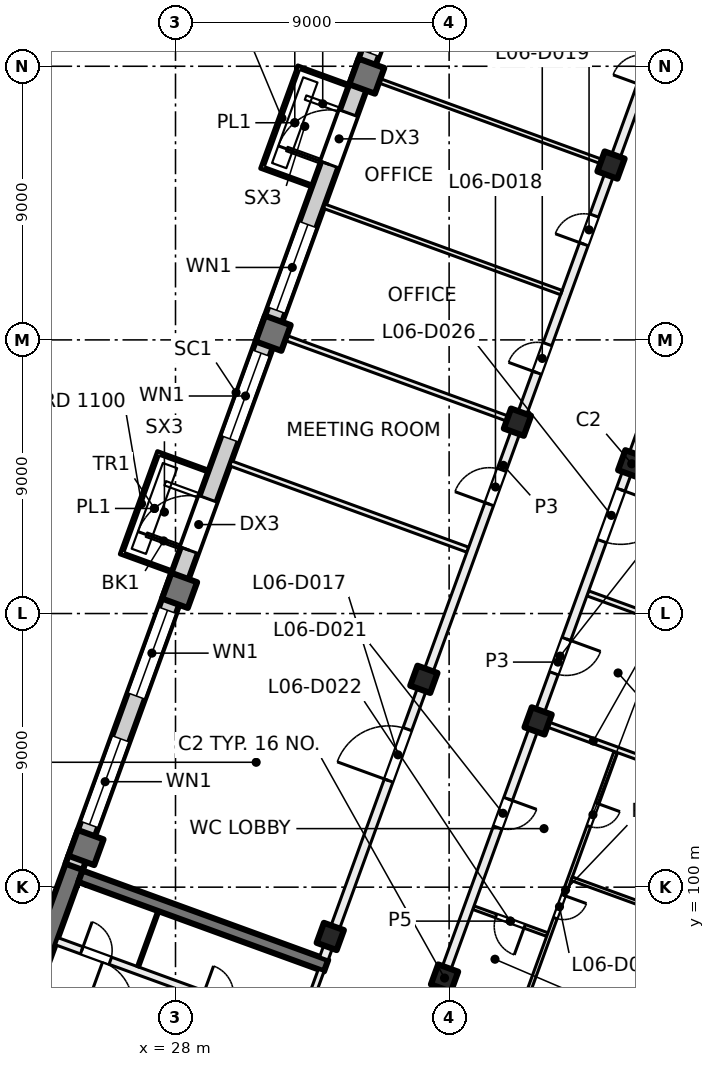
"""IFC4 building model, lengths in metres.
Left out: names, types, materials, properties, quantities, classifications, styles, units other than length and angle.
Written with IfcOpenShell. Run it as: python <this file> out.ifc"""

import sys

from ifc_helpers import new_model, si_unit, direction, frame, frame_2d, origin, origin_2d, place, context, subcontext, project, spatial, rectangle, extrude, element, fill, save


model = new_model("IFC4")
c1 = context("Model", 3, precision=1e-05, world=origin(), true_north=direction((0.0, 1.0)))
c2 = subcontext(c1, "Body", "Model", "MODEL_VIEW")
j1 = project(units=[si_unit("LENGTHUNIT", "METRE"), si_unit("PLANEANGLEUNIT", "RADIAN")], contexts=[c1])
p1 = place(None, origin())
s1 = spatial("IfcSite", under=j1, at=p1, CompositionType="ELEMENT")
p2 = place(p1, origin())
s2 = spatial("IfcBuilding", under=s1, at=p2, CompositionType="ELEMENT")
p3 = place(p2, frame((0.0, 0.0, 31.5)))
s3 = spatial("IfcBuildingStorey", under=s2, at=p3, CompositionType="ELEMENT", Elevation=31.5)
for number, where, z_axis, x_axis in (
    (1, (43.006, 113.925, 0.0), (0.0, 0.0, 1.0), (-0.342, -0.94, 0.0)),
    (2, (39.927, 105.468, 0.0), (0.0, 0.0, 1.0), (-0.342, -0.94, 0.0)),
    (3, (36.849, 97.011, 0.0), (0.0, 0.0, 1.0), (-0.342, -0.94, 0.0)),
    (4, (42.325, 123.751, 0.0), (0.0, 0.0, 1.0), (-0.342, -0.94, 0.0)),
    (5, (39.247, 115.293, 0.0), (0.0, 0.0, 1.0), (-0.342, -0.94, 0.0)),
    (6, (36.169, 106.836, 0.0), (0.0, 0.0, 1.0), (-0.342, -0.94, 0.0)),
    (7, (33.091, 98.379, 0.0), (0.0, 0.0, 1.0), (-0.342, -0.94, 0.0)),
):
    element("IfcColumn", number, at=place(p3, frame(where, z_axis=z_axis, x_axis=x_axis)), inside=s3, PredefinedType="COLUMN", context=c2, shape_type="SweptSolid", body=[
        extrude(rectangle(XDim=0.7, YDim=0.7, at=origin_2d()), origin(), (0.0, 0.0, 1.0), 4.0),
    ])
for number, where, z_axis, x_axis in (
    (8, (34.291, 126.675, 0.0), (0.0, 0.0, 1.0), (-0.342, -0.94, 0.0)),
    (9, (31.212, 118.218, 0.0), (0.0, 0.0, 1.0), (-0.342, -0.94, 0.0)),
    (10, (28.134, 109.76, 0.0), (0.0, 0.0, 1.0), (-0.342, -0.94, 0.0)),
    (11, (25.056, 101.303, 0.0), (0.0, 0.0, 1.0), (-0.342, -0.94, 0.0)),
):
    element("IfcColumn", number, at=place(p3, frame(where, z_axis=z_axis, x_axis=x_axis)), inside=s3, PredefinedType="COLUMN", context=c2, shape_type="SweptSolid", body=[
        extrude(rectangle(XDim=0.9, YDim=0.9, at=origin_2d()), origin(), (0.0, 0.0, 1.0), 4.0),
    ])
p4 = place(p3, frame((21.717, 92.568, 0.0), z_axis=(0.0, 0.0, 1.0), x_axis=(0.342016162452, 0.939694069696, 0.0)))
e12 = element("IfcWall", 12, at=p4, inside=s3, PredefinedType="SHEAR", context=c2, shape_type="SweptSolid", body=[
    extrude(rectangle(XDim=8.9, YDim=0.6, at=frame_2d((4.45, 0.0))), origin(), (0.0, 0.0, 1.0), 4.0),
])
p5 = place(p3, frame((32.953, 97.418, 0.0), z_axis=(0.0, 0.0, 1.0), x_axis=(-0.93969060187, 0.342025690201, 0.0)))
e13 = element("IfcWall", 13, at=p5, inside=s3, PredefinedType="SHEAR", context=c2, shape_type="SweptSolid", body=[
    extrude(rectangle(XDim=8.6, YDim=0.4, at=frame_2d((4.3, 0.0))), origin(), (0.0, 0.0, 1.0), 4.0),
])
p6 = place(p3, frame((24.666, 100.669, 0.0), z_axis=(0.0, 0.0, 1.0), x_axis=(0.34201964167, 0.939692803373, 0.0)))
e14 = element("IfcWall", 14, at=p6, inside=s3, PredefinedType="SOLIDWALL", context=c2, shape_type="SweptSolid", body=[
    extrude(rectangle(XDim=32.884, YDim=0.6, at=frame_2d((16.442, 0.0))), origin(), (0.0, 0.0, 1.0), 3.625),
])
p7 = place(p6, frame((1.48, 0.0, 0.9)))
e15 = element("IfcOpeningElement", 15, at=p7, cuts=e14, PredefinedType="OPENING", context=c2, shape_type="SweptSolid", body=[
    extrude(rectangle(XDim=3.0, YDim=2.4, at=frame_2d((1.5, 1.2))), frame((0.0, 0.31, 0.0), z_axis=(0.0, -1.0, 0.0), x_axis=(1.0, 0.0, 0.0)), (0.0, 0.0, 1.0), 0.62),
])
p8 = place(p6, frame((5.98, 0.0, 0.9)))
e16 = element("IfcOpeningElement", 16, at=p8, cuts=e14, PredefinedType="OPENING", context=c2, shape_type="SweptSolid", body=[
    extrude(rectangle(XDim=3.0, YDim=2.4, at=frame_2d((1.5, 1.2))), frame((0.0, 0.31, 0.0), z_axis=(0.0, -1.0, 0.0), x_axis=(1.0, 0.0, 0.0)), (0.0, 0.0, 1.0), 0.62),
])
p9 = place(p6, frame((11.08, 0.0, 0.0)))
e17 = element("IfcOpeningElement", 17, at=p9, cuts=e14, PredefinedType="OPENING", context=c2, shape_type="SweptSolid", body=[
    extrude(rectangle(XDim=1.8, YDim=2.4, at=frame_2d((0.9, 1.2))), frame((0.0, 0.31, 0.0), z_axis=(0.0, -1.0, 0.0), x_axis=(1.0, 0.0, 0.0)), (0.0, 0.0, 1.0), 0.62),
])
p10 = place(p6, frame((14.98, 0.0, 0.9)))
e18 = element("IfcOpeningElement", 18, at=p10, cuts=e14, PredefinedType="OPENING", context=c2, shape_type="SweptSolid", body=[
    extrude(rectangle(XDim=3.0, YDim=2.4, at=frame_2d((1.5, 1.2))), frame((0.0, 0.31, 0.0), z_axis=(0.0, -1.0, 0.0), x_axis=(1.0, 0.0, 0.0)), (0.0, 0.0, 1.0), 0.62),
])
p11 = place(p6, frame((19.48, 0.0, 0.9)))
e19 = element("IfcOpeningElement", 19, at=p11, cuts=e14, PredefinedType="OPENING", context=c2, shape_type="SweptSolid", body=[
    extrude(rectangle(XDim=3.0, YDim=2.4, at=frame_2d((1.5, 1.2))), frame((0.0, 0.31, 0.0), z_axis=(0.0, -1.0, 0.0), x_axis=(1.0, 0.0, 0.0)), (0.0, 0.0, 1.0), 0.62),
])
p12 = place(p6, frame((24.58, 0.0, 0.0)))
e20 = element("IfcOpeningElement", 20, at=p12, cuts=e14, PredefinedType="OPENING", context=c2, shape_type="SweptSolid", body=[
    extrude(rectangle(XDim=1.8, YDim=2.4, at=frame_2d((0.9, 1.2))), frame((0.0, 0.31, 0.0), z_axis=(0.0, -1.0, 0.0), x_axis=(1.0, 0.0, 0.0)), (0.0, 0.0, 1.0), 0.62),
])
p13 = place(p6, frame((28.48, 0.0, 0.9)))
e21 = element("IfcOpeningElement", 21, at=p13, cuts=e14, PredefinedType="OPENING", context=c2, shape_type="SweptSolid", body=[
    extrude(rectangle(XDim=3.0, YDim=2.4, at=frame_2d((1.5, 1.2))), frame((0.0, 0.31, 0.0), z_axis=(0.0, -1.0, 0.0), x_axis=(1.0, 0.0, 0.0)), (0.0, 0.0, 1.0), 0.62),
])
p14 = place(p3, frame((31.491, 93.693, 0.0), z_axis=(0.0, 0.0, 1.0), x_axis=(0.341995824804, 0.939701471648, 0.0)))
e22 = element("IfcWall", 22, at=p14, inside=s3, PredefinedType="PARTITIONING", context=c2, shape_type="SweptSolid", body=[
    extrude(rectangle(XDim=3.8, YDim=0.2, at=frame_2d((1.9, 0.0))), origin(), (0.0, 0.0, 1.0), 3.625),
])
p15 = place(p14, frame((0.3, 0.0, 0.0)))
e23 = element("IfcOpeningElement", 23, at=p15, cuts=e22, PredefinedType="OPENING", context=c2, shape_type="SweptSolid", body=[
    extrude(rectangle(XDim=1.2, YDim=2.1, at=frame_2d((0.6, 1.05))), frame((0.0, 0.11, 0.0), z_axis=(0.0, -1.0, 0.0), x_axis=(1.0, 0.0, 0.0)), (0.0, 0.0, 1.0), 0.22),
])
p16 = place(p3, frame((23.538, 96.694, 0.0), z_axis=(0.0, 0.0, 1.0), x_axis=(0.939691552312, -0.342023078919, 0.0)))
e24 = element("IfcWall", 24, at=p16, inside=s3, PredefinedType="PARTITIONING", context=c2, shape_type="SweptSolid", body=[
    extrude(rectangle(XDim=8.4, YDim=0.2, at=frame_2d((4.2, 0.0))), origin(), (0.0, 0.0, 1.0), 3.625),
])
p17 = place(p16, frame((1.65, 0.0, 0.0)))
e25 = element("IfcOpeningElement", 25, at=p17, cuts=e24, PredefinedType="OPENING", context=c2, shape_type="SweptSolid", body=[
    extrude(rectangle(XDim=1.5, YDim=2.1, at=frame_2d((0.75, 1.05))), frame((0.0, 0.11, 0.0), z_axis=(0.0, -1.0, 0.0), x_axis=(1.0, 0.0, 0.0)), (0.0, 0.0, 1.0), 0.22),
])
p18 = place(p3, frame((24.094, 98.221, 0.0), z_axis=(0.0, 0.0, 1.0), x_axis=(0.939691552312, -0.342023078919, 0.0)))
e26 = element("IfcWall", 26, at=p18, inside=s3, PredefinedType="PARTITIONING", context=c2, shape_type="SweptSolid", body=[
    extrude(rectangle(XDim=8.4, YDim=0.25, at=frame_2d((4.2, 0.0))), origin(), (0.0, 0.0, 1.0), 3.625),
])
p19 = place(p18, frame((5.125, 0.0, 0.0)))
e27 = element("IfcOpeningElement", 27, at=p19, cuts=e26, PredefinedType="OPENING", context=c2, shape_type="SweptSolid", body=[
    extrude(rectangle(XDim=1.0, YDim=2.1, at=frame_2d((0.5, 1.05))), frame((0.0, 0.135, 0.0), z_axis=(0.0, -1.0, 0.0), x_axis=(1.0, 0.0, 0.0)), (0.0, 0.0, 1.0), 0.27),
])
p20 = place(p18, frame((0.875, 0.0, 0.0)))
e28 = element("IfcOpeningElement", 28, at=p20, cuts=e26, PredefinedType="OPENING", context=c2, shape_type="SweptSolid", body=[
    extrude(rectangle(XDim=1.0, YDim=2.1, at=frame_2d((0.5, 1.05))), frame((0.0, 0.135, 0.0), z_axis=(0.0, -1.0, 0.0), x_axis=(1.0, 0.0, 0.0)), (0.0, 0.0, 1.0), 0.27),
])
p21 = place(p3, frame((26.768, 97.381, 0.0), z_axis=(0.0, 0.0, 1.0), x_axis=(0.342024501273, 0.939691034611, 0.0)))
e29 = element("IfcWall", 29, at=p21, inside=s3, PredefinedType="PARTITIONING", context=c2, shape_type="SweptSolid", body=[
    extrude(rectangle(XDim=1.95, YDim=0.1, at=frame_2d((0.975, 0.0))), origin(), (0.0, 0.0, 1.0), 3.625),
])
p22 = place(p3, frame((29.814, 113.938, 0.0), z_axis=(0.0, 0.0, 1.0), x_axis=(0.939697205528, -0.342007546586, 0.0)))
e30 = element("IfcWall", 30, at=p22, inside=s3, PredefinedType="PARTITIONING", context=c2, shape_type="SweptSolid", body=[
    extrude(rectangle(XDim=8.301, YDim=0.175, at=frame_2d((4.15, 0.0))), origin(), (0.0, 0.0, 1.0), 3.625),
])
p23 = place(p3, frame((31.353, 118.166, 0.0), z_axis=(0.0, 0.0, 1.0), x_axis=(0.939687752599, -0.342033518263, 0.0)))
e31 = element("IfcWall", 31, at=p23, inside=s3, PredefinedType="PARTITIONING", context=c2, shape_type="SweptSolid", body=[
    extrude(rectangle(XDim=8.301, YDim=0.175, at=frame_2d((4.15, 0.0))), origin(), (0.0, 0.0, 1.0), 3.625),
])
p24 = place(p3, frame((32.881, 97.657, 0.0), z_axis=(0.0, 0.0, 1.0), x_axis=(0.342017360004, 0.939693633828, 0.0)))
e32 = element("IfcWall", 32, at=p24, inside=s3, PredefinedType="PARTITIONING", context=c2, shape_type="SweptSolid", body=[
    extrude(rectangle(XDim=34.516, YDim=0.3, at=frame_2d((17.258, 0.0))), origin(), (0.0, 0.0, 1.0), 3.625),
])
p25 = place(p24, frame((6.225, 0.0, 0.0)))
e33 = element("IfcOpeningElement", 33, at=p25, cuts=e32, PredefinedType="OPENING", context=c2, shape_type="SweptSolid", body=[
    extrude(rectangle(XDim=1.8, YDim=2.1, at=frame_2d((0.9, 1.05))), frame((0.0, 0.16, 0.0), z_axis=(0.0, -1.0, 0.0), x_axis=(1.0, 0.0, 0.0)), (0.0, 0.0, 1.0), 0.32),
])
p26 = place(p24, frame((15.9, 0.0, 0.0)))
e34 = element("IfcOpeningElement", 34, at=p26, cuts=e32, PredefinedType="OPENING", context=c2, shape_type="SweptSolid", body=[
    extrude(rectangle(XDim=1.2, YDim=2.1, at=frame_2d((0.6, 1.05))), frame((0.0, 0.16, 0.0), z_axis=(0.0, -1.0, 0.0), x_axis=(1.0, 0.0, 0.0)), (0.0, 0.0, 1.0), 0.32),
])
p27 = place(p24, frame((20.5, 0.0, 0.0)))
e35 = element("IfcOpeningElement", 35, at=p27, cuts=e32, PredefinedType="OPENING", context=c2, shape_type="SweptSolid", body=[
    extrude(rectangle(XDim=1.0, YDim=2.1, at=frame_2d((0.5, 1.05))), frame((0.0, 0.16, 0.0), z_axis=(0.0, -1.0, 0.0), x_axis=(1.0, 0.0, 0.0)), (0.0, 0.0, 1.0), 0.32),
])
p28 = place(p24, frame((25.0, 0.0, 0.0)))
e36 = element("IfcOpeningElement", 36, at=p28, cuts=e32, PredefinedType="OPENING", context=c2, shape_type="SweptSolid", body=[
    extrude(rectangle(XDim=1.0, YDim=2.1, at=frame_2d((0.5, 1.05))), frame((0.0, 0.16, 0.0), z_axis=(0.0, -1.0, 0.0), x_axis=(1.0, 0.0, 0.0)), (0.0, 0.0, 1.0), 0.32),
])
p29 = place(p24, frame((30.562, 0.0, 0.0)))
e37 = element("IfcOpeningElement", 37, at=p29, cuts=e32, PredefinedType="OPENING", context=c2, shape_type="SweptSolid", body=[
    extrude(rectangle(XDim=1.0, YDim=2.1, at=frame_2d((0.5, 1.05))), frame((0.0, 0.16, 0.0), z_axis=(0.0, -1.0, 0.0), x_axis=(1.0, 0.0, 0.0)), (0.0, 0.0, 1.0), 0.32),
])
p30 = place(p3, frame((32.892, 122.395, 0.0), z_axis=(0.0, 0.0, 1.0), x_axis=(0.939684311623, -0.3420429717, 0.0)))
e38 = element("IfcWall", 38, at=p30, inside=s3, PredefinedType="PARTITIONING", context=c2, shape_type="SweptSolid", body=[
    extrude(rectangle(XDim=8.301, YDim=0.15, at=frame_2d((4.15, 0.0))), origin(), (0.0, 0.0, 1.0), 3.625),
])
p31 = place(p3, frame((40.229, 98.441, 0.0), z_axis=(0.0, 0.0, 1.0), x_axis=(-0.939663852573, 0.342099173001, 0.0)))
e39 = element("IfcWall", 39, at=p31, inside=s3, PredefinedType="PARTITIONING", context=c2, shape_type="SweptSolid", body=[
    extrude(rectangle(XDim=2.587, YDim=0.125, at=frame_2d((1.293, 0.0))), origin(), (0.0, 0.0, 1.0), 3.625),
])
p32 = place(p31, frame((0.794, 0.0, 0.0)))
e40 = element("IfcOpeningElement", 40, at=p32, cuts=e39, PredefinedType="OPENING", context=c2, shape_type="SweptSolid", body=[
    extrude(rectangle(XDim=1.0, YDim=2.1, at=frame_2d((0.5, 1.05))), frame((0.0, 0.073, 0.0), z_axis=(0.0, -1.0, 0.0), x_axis=(1.0, 0.0, 0.0)), (0.0, 0.0, 1.0), 0.145),
])
p33 = place(p3, frame((42.482, 104.446, 0.0), z_axis=(0.0, 0.0, 1.0), x_axis=(-0.342025030348, -0.939690842041, 0.0)))
e41 = element("IfcWall", 41, at=p33, inside=s3, PredefinedType="PARTITIONING", context=c2, shape_type="SweptSolid", body=[
    extrude(rectangle(XDim=9.663, YDim=0.125, at=frame_2d((4.832, 0.0))), origin(), (0.0, 0.0, 1.0), 3.625),
])
p34 = place(p33, frame((1.797, 0.0, 0.0)))
e42 = element("IfcOpeningElement", 42, at=p34, cuts=e41, PredefinedType="OPENING", context=c2, shape_type="SweptSolid", body=[
    extrude(rectangle(XDim=0.8, YDim=2.1, at=frame_2d((0.4, 1.05))), frame((0.0, 0.073, 0.0), z_axis=(0.0, -1.0, 0.0), x_axis=(1.0, 0.0, 0.0)), (0.0, 0.0, 1.0), 0.145),
])
p35 = place(p33, frame((5.015, 0.0, 0.0)))
e43 = element("IfcOpeningElement", 43, at=p35, cuts=e41, PredefinedType="OPENING", context=c2, shape_type="SweptSolid", body=[
    extrude(rectangle(XDim=0.8, YDim=2.1, at=frame_2d((0.4, 1.05))), frame((0.0, 0.073, 0.0), z_axis=(0.0, -1.0, 0.0), x_axis=(1.0, 0.0, 0.0)), (0.0, 0.0, 1.0), 0.145),
])
p36 = place(p3, frame((40.021, 105.434, 0.0), z_axis=(0.0, 0.0, 1.0), x_axis=(0.939740864669, -0.341887565249, 0.0)))
e44 = element("IfcWall", 44, at=p36, inside=s3, PredefinedType="PARTITIONING", context=c2, shape_type="SweptSolid", body=[
    extrude(rectangle(XDim=3.663, YDim=0.175, at=frame_2d((1.831, 0.0))), origin(), (0.0, 0.0, 1.0), 3.625),
])
p37 = place(p3, frame((41.031, 100.278, 0.0), z_axis=(0.0, 0.0, 1.0), x_axis=(0.939696437289, -0.342009657388, 0.0)))
e45 = element("IfcWall", 45, at=p37, inside=s3, PredefinedType="PARTITIONING", context=c2, shape_type="SweptSolid", body=[
    extrude(rectangle(XDim=5.588, YDim=0.125, at=frame_2d((2.794, 0.0))), origin(), (0.0, 0.0, 1.0), 3.625),
])
p38 = place(p3, frame((41.561, 109.663, 0.0), z_axis=(0.0, 0.0, 1.0), x_axis=(0.939623960717, -0.342208726434, 0.0)))
e46 = element("IfcWall", 46, at=p38, inside=s3, PredefinedType="PARTITIONING", context=c2, shape_type="SweptSolid", body=[
    extrude(rectangle(XDim=3.662, YDim=0.175, at=frame_2d((1.831, 0.0))), origin(), (0.0, 0.0, 1.0), 3.625),
])
p39 = place(p3, frame((42.231, 123.785, 0.0), z_axis=(0.0, 0.0, 1.0), x_axis=(-0.939687752599, 0.342033518263, 0.0)))
e47 = element("IfcWall", 47, at=p39, inside=s3, PredefinedType="PARTITIONING", context=c2, shape_type="SweptSolid", body=[
    extrude(rectangle(XDim=8.301, YDim=0.15, at=frame_2d((4.15, 0.0))), origin(), (0.0, 0.0, 1.0), 3.625),
])
p40 = place(p3, frame((44.612, 118.483, 0.0), z_axis=(0.0, 0.0, 1.0), x_axis=(-0.342043123066, -0.939684256526, 0.0)))
e48 = element("IfcWall", 48, at=p40, inside=s3, PredefinedType="PARTITIONING", context=c2, shape_type="SweptSolid", body=[
    extrude(rectangle(XDim=23.582, YDim=0.3, at=frame_2d((11.791, 0.0))), origin(), (0.0, 0.0, 1.0), 3.625),
])
p41 = place(p40, frame((16.583, 0.0, 0.0)))
e49 = element("IfcOpeningElement", 49, at=p41, cuts=e48, PredefinedType="OPENING", context=c2, shape_type="SweptSolid", body=[
    extrude(rectangle(XDim=1.0, YDim=2.1, at=frame_2d((0.5, 1.05))), frame((0.0, 0.16, 0.0), z_axis=(0.0, -1.0, 0.0), x_axis=(1.0, 0.0, 0.0)), (0.0, 0.0, 1.0), 0.32),
])
p42 = place(p40, frame((10.982, 0.0, 0.0)))
e50 = element("IfcOpeningElement", 50, at=p42, cuts=e48, PredefinedType="OPENING", context=c2, shape_type="SweptSolid", body=[
    extrude(rectangle(XDim=1.2, YDim=2.1, at=frame_2d((0.6, 1.05))), frame((0.0, 0.16, 0.0), z_axis=(0.0, -1.0, 0.0), x_axis=(1.0, 0.0, 0.0)), (0.0, 0.0, 1.0), 0.32),
])
p43 = place(p40, frame((5.756, 0.0, 0.0)))
e51 = element("IfcOpeningElement", 51, at=p43, cuts=e48, PredefinedType="OPENING", context=c2, shape_type="SweptSolid", body=[
    extrude(rectangle(XDim=1.8, YDim=2.1, at=frame_2d((0.9, 1.05))), frame((0.0, 0.16, 0.0), z_axis=(0.0, -1.0, 0.0), x_axis=(1.0, 0.0, 0.0)), (0.0, 0.0, 1.0), 0.32),
])
p44 = place(p7, origin())
e52 = element("IfcWindow", 52, at=p44, inside=s3, PartitioningType="SINGLE_PANEL", PredefinedType="WINDOW", context=c2, shape_type="SweptSolid", body=[
    extrude(rectangle(XDim=3.0, YDim=2.4, at=frame_2d((1.5, 1.2))), frame((0.0, 0.03, 0.0), z_axis=(0.0, -1.0, 0.0), x_axis=(1.0, 0.0, 0.0)), (0.0, 0.0, 1.0), 0.06),
])
fill(e15, e52)
p45 = place(p8, origin())
e53 = element("IfcWindow", 53, at=p45, inside=s3, PartitioningType="SINGLE_PANEL", PredefinedType="WINDOW", context=c2, shape_type="SweptSolid", body=[
    extrude(rectangle(XDim=3.0, YDim=2.4, at=frame_2d((1.5, 1.2))), frame((0.0, 0.03, 0.0), z_axis=(0.0, -1.0, 0.0), x_axis=(1.0, 0.0, 0.0)), (0.0, 0.0, 1.0), 0.06),
])
fill(e16, e53)
p46 = place(p9, origin())
e54 = element("IfcDoor", 54, at=p46, inside=s3, OperationType="DOUBLE_DOOR_SINGLE_SWING", PredefinedType="DOOR", context=c2, shape_type="SweptSolid", body=[
    extrude(rectangle(XDim=1.8, YDim=2.4, at=frame_2d((0.9, 1.2))), frame((0.0, 0.025, 0.0), z_axis=(0.0, -1.0, 0.0), x_axis=(1.0, 0.0, 0.0)), (0.0, 0.0, 1.0), 0.05),
])
fill(e17, e54)
p47 = place(p10, origin())
e55 = element("IfcWindow", 55, at=p47, inside=s3, PartitioningType="SINGLE_PANEL", PredefinedType="WINDOW", context=c2, shape_type="SweptSolid", body=[
    extrude(rectangle(XDim=3.0, YDim=2.4, at=frame_2d((1.5, 1.2))), frame((0.0, 0.03, 0.0), z_axis=(0.0, -1.0, 0.0), x_axis=(1.0, 0.0, 0.0)), (0.0, 0.0, 1.0), 0.06),
])
fill(e18, e55)
p48 = place(p11, origin())
e56 = element("IfcWindow", 56, at=p48, inside=s3, PartitioningType="SINGLE_PANEL", PredefinedType="WINDOW", context=c2, shape_type="SweptSolid", body=[
    extrude(rectangle(XDim=3.0, YDim=2.4, at=frame_2d((1.5, 1.2))), frame((0.0, 0.03, 0.0), z_axis=(0.0, -1.0, 0.0), x_axis=(1.0, 0.0, 0.0)), (0.0, 0.0, 1.0), 0.06),
])
fill(e19, e56)
p49 = place(p12, origin())
e57 = element("IfcDoor", 57, at=p49, inside=s3, OperationType="DOUBLE_DOOR_SINGLE_SWING", PredefinedType="DOOR", context=c2, shape_type="SweptSolid", body=[
    extrude(rectangle(XDim=1.8, YDim=2.4, at=frame_2d((0.9, 1.2))), frame((0.0, 0.025, 0.0), z_axis=(0.0, -1.0, 0.0), x_axis=(1.0, 0.0, 0.0)), (0.0, 0.0, 1.0), 0.05),
])
fill(e20, e57)
p50 = place(p13, origin())
e58 = element("IfcWindow", 58, at=p50, inside=s3, PartitioningType="SINGLE_PANEL", PredefinedType="WINDOW", context=c2, shape_type="SweptSolid", body=[
    extrude(rectangle(XDim=3.0, YDim=2.4, at=frame_2d((1.5, 1.2))), frame((0.0, 0.03, 0.0), z_axis=(0.0, -1.0, 0.0), x_axis=(1.0, 0.0, 0.0)), (0.0, 0.0, 1.0), 0.06),
])
fill(e21, e58)
p51 = place(p20, origin())
e59 = element("IfcDoor", 59, at=p51, inside=s3, OperationType="SINGLE_SWING_RIGHT", PredefinedType="DOOR", context=c2, shape_type="SweptSolid", body=[
    extrude(rectangle(XDim=1.0, YDim=2.1, at=frame_2d((0.5, 1.05))), frame((0.0, 0.025, 0.0), z_axis=(0.0, -1.0, 0.0), x_axis=(1.0, 0.0, 0.0)), (0.0, 0.0, 1.0), 0.05),
])
fill(e28, e59)
p52 = place(p25, origin())
e60 = element("IfcDoor", 60, at=p52, inside=s3, OperationType="DOUBLE_DOOR_SINGLE_SWING", PredefinedType="DOOR", context=c2, shape_type="SweptSolid", body=[
    extrude(rectangle(XDim=1.8, YDim=2.1, at=frame_2d((0.9, 1.05))), frame((0.0, 0.025, 0.0), z_axis=(0.0, -1.0, 0.0), x_axis=(1.0, 0.0, 0.0)), (0.0, 0.0, 1.0), 0.05),
])
fill(e33, e60)
p53 = place(p26, origin())
e61 = element("IfcDoor", 61, at=p53, inside=s3, OperationType="DOUBLE_DOOR_SINGLE_SWING", PredefinedType="DOOR", context=c2, shape_type="SweptSolid", body=[
    extrude(rectangle(XDim=1.2, YDim=2.1, at=frame_2d((0.6, 1.05))), frame((0.0, 0.025, 0.0), z_axis=(0.0, -1.0, 0.0), x_axis=(1.0, 0.0, 0.0)), (0.0, 0.0, 1.0), 0.05),
])
fill(e34, e61)
p54 = place(p27, origin())
e62 = element("IfcDoor", 62, at=p54, inside=s3, OperationType="SINGLE_SWING_LEFT", PredefinedType="DOOR", context=c2, shape_type="SweptSolid", body=[
    extrude(rectangle(XDim=1.0, YDim=2.1, at=frame_2d((0.5, 1.05))), frame((0.0, 0.025, 0.0), z_axis=(0.0, -1.0, 0.0), x_axis=(1.0, 0.0, 0.0)), (0.0, 0.0, 1.0), 0.05),
])
fill(e35, e62)
p55 = place(p28, origin())
e63 = element("IfcDoor", 63, at=p55, inside=s3, OperationType="SINGLE_SWING_RIGHT", PredefinedType="DOOR", context=c2, shape_type="SweptSolid", body=[
    extrude(rectangle(XDim=1.0, YDim=2.1, at=frame_2d((0.5, 1.05))), frame((0.0, 0.025, 0.0), z_axis=(0.0, -1.0, 0.0), x_axis=(1.0, 0.0, 0.0)), (0.0, 0.0, 1.0), 0.05),
])
fill(e36, e63)
p56 = place(p41, origin())
e64 = element("IfcDoor", 64, at=p56, inside=s3, OperationType="SINGLE_SWING_LEFT", PredefinedType="DOOR", context=c2, shape_type="SweptSolid", body=[
    extrude(rectangle(XDim=1.0, YDim=2.1, at=frame_2d((0.5, 1.05))), frame((0.0, 0.025, 0.0), z_axis=(0.0, -1.0, 0.0), x_axis=(1.0, 0.0, 0.0)), (0.0, 0.0, 1.0), 0.05),
])
fill(e49, e64)
p57 = place(p32, origin())
e65 = element("IfcDoor", 65, at=p57, inside=s3, OperationType="SINGLE_SWING_RIGHT", PredefinedType="DOOR", context=c2, shape_type="SweptSolid", body=[
    extrude(rectangle(XDim=1.0, YDim=2.1, at=frame_2d((0.5, 1.05))), frame((0.0, 0.025, 0.0), z_axis=(0.0, -1.0, 0.0), x_axis=(1.0, 0.0, 0.0)), (0.0, 0.0, 1.0), 0.05),
])
fill(e40, e65)
p58 = place(p34, origin())
e66 = element("IfcDoor", 66, at=p58, inside=s3, OperationType="SINGLE_SWING_RIGHT", PredefinedType="DOOR", context=c2, shape_type="SweptSolid", body=[
    extrude(rectangle(XDim=0.8, YDim=2.1, at=frame_2d((0.4, 1.05))), frame((0.0, 0.025, 0.0), z_axis=(0.0, -1.0, 0.0), x_axis=(1.0, 0.0, 0.0)), (0.0, 0.0, 1.0), 0.05),
])
fill(e42, e66)
p59 = place(p35, origin())
e67 = element("IfcDoor", 67, at=p59, inside=s3, OperationType="SINGLE_SWING_LEFT", PredefinedType="DOOR", context=c2, shape_type="SweptSolid", body=[
    extrude(rectangle(XDim=0.8, YDim=2.1, at=frame_2d((0.4, 1.05))), frame((0.0, 0.025, 0.0), z_axis=(0.0, -1.0, 0.0), x_axis=(1.0, 0.0, 0.0)), (0.0, 0.0, 1.0), 0.05),
])
fill(e43, e67)
p60 = place(p42, origin())
e68 = element("IfcDoor", 68, at=p60, inside=s3, OperationType="DOUBLE_DOOR_SINGLE_SWING", PredefinedType="DOOR", context=c2, shape_type="SweptSolid", body=[
    extrude(rectangle(XDim=1.2, YDim=2.1, at=frame_2d((0.6, 1.05))), frame((0.0, 0.025, 0.0), z_axis=(0.0, -1.0, 0.0), x_axis=(1.0, 0.0, 0.0)), (0.0, 0.0, 1.0), 0.05),
])
fill(e50, e68)
p61 = place(p43, origin())
e69 = element("IfcDoor", 69, at=p61, inside=s3, OperationType="DOUBLE_DOOR_SINGLE_SWING", PredefinedType="DOOR", context=c2, shape_type="SweptSolid", body=[
    extrude(rectangle(XDim=1.8, YDim=2.1, at=frame_2d((0.9, 1.05))), frame((0.0, 0.025, 0.0), z_axis=(0.0, -1.0, 0.0), x_axis=(1.0, 0.0, 0.0)), (0.0, 0.0, 1.0), 0.05),
])
fill(e51, e69)
save(model, sys.argv[1])
